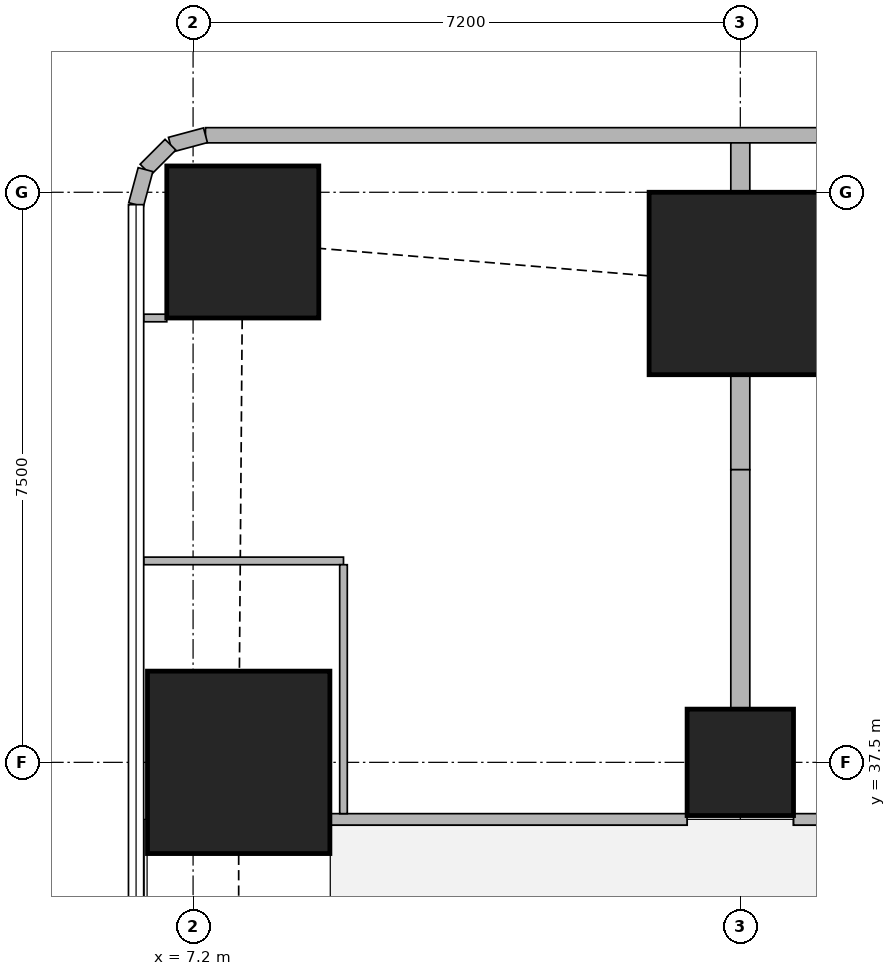
"""IFC4 building model, lengths in metres.
Left out: names, types, materials, properties, quantities, classifications, styles, units other than length and angle.
Written with IfcOpenShell. Run it as: python <this file> out.ifc"""

import sys

from ifc_helpers import new_model, si_unit, direction, frame, frame_2d, origin, origin_2d, place, context, subcontext, project, spatial, rectangle, extrude, element, fill, save


model = new_model("IFC4")
c1 = context("Model", 3, precision=1e-05, world=origin(), true_north=direction((0.0, 1.0)))
c2 = subcontext(c1, "Body", "Model", "MODEL_VIEW")
j1 = project(units=[si_unit("LENGTHUNIT", "METRE"), si_unit("PLANEANGLEUNIT", "RADIAN")], contexts=[c1])
p1 = place(None, origin())
s1 = spatial("IfcSite", under=j1, at=p1, CompositionType="ELEMENT")
p2 = place(p1, origin())
s2 = spatial("IfcBuilding", under=s1, at=p2, CompositionType="ELEMENT")
p3 = place(p2, frame((0.0, 0.0, 216.2)))
s3 = spatial("IfcBuildingStorey", under=s2, at=p3, CompositionType="ELEMENT", Elevation=216.2)
p4 = place(p3, frame((7.8, 37.5, 0.0), z_axis=(0.0, 0.0, 1.0), x_axis=(1.0, 0.0, 0.0)))
e1 = element("IfcColumn", 1, at=p4, inside=s3, PredefinedType="COLUMN", context=c2, shape_type="SweptSolid", body=[
    extrude(rectangle(XDim=2.4, YDim=2.4, at=origin_2d()), origin(), (0.0, 0.0, 1.0), 3.75),
])
p5 = place(p3, frame((14.4, 37.5, 0.0), z_axis=(0.0, 0.0, 1.0), x_axis=(1.0, 0.0, 0.0)))
e2 = element("IfcColumn", 2, at=p5, inside=s3, PredefinedType="COLUMN", context=c2, shape_type="SweptSolid", body=[
    extrude(rectangle(XDim=1.4, YDim=1.4, at=origin_2d()), origin(), (0.0, 0.0, 1.0), 3.75),
])
p6 = place(p3, frame((7.854, 44.346, 0.0), z_axis=(0.0, 0.0, 1.0), x_axis=(1.0, 0.0, 0.0)))
e3 = element("IfcColumn", 3, at=p6, inside=s3, PredefinedType="COLUMN", context=c2, shape_type="SweptSolid", body=[
    extrude(rectangle(XDim=2.0, YDim=2.0, at=origin_2d()), origin(), (0.0, 0.0, 1.0), 3.75),
])
p7 = place(p3, frame((14.4, 43.8, 0.0), z_axis=(0.0, 0.0, 1.0), x_axis=(1.0, 0.0, 0.0)))
e4 = element("IfcColumn", 4, at=p7, inside=s3, PredefinedType="COLUMN", context=c2, shape_type="SweptSolid", body=[
    extrude(rectangle(XDim=2.4, YDim=2.4, at=origin_2d()), origin(), (0.0, 0.0, 1.0), 3.75),
])
p8 = place(p3, frame((40.106, 45.75, 0.0), z_axis=(0.0, 0.0, 1.0), x_axis=(-1.0, 0.0, 0.0)))
e5 = element("IfcWall", 5, at=p8, inside=s3, PredefinedType="SOLIDWALL", context=c2, shape_type="SweptSolid", body=[
    extrude(rectangle(XDim=32.743, YDim=0.2, at=frame_2d((16.372, 0.0))), origin(), (0.0, 0.0, 1.0), 3.5),
])
p9 = place(p8, frame((8.606, 0.0, 0.9)))
e6 = element("IfcOpeningElement", 6, at=p9, cuts=e5, PredefinedType="OPENING", context=c2, shape_type="SweptSolid", body=[
    extrude(rectangle(XDim=1.8, YDim=1.5, at=frame_2d((0.9, 0.75))), frame((0.0, 0.11, 0.0), z_axis=(0.0, -1.0, 0.0), x_axis=(1.0, 0.0, 0.0)), (0.0, 0.0, 1.0), 0.22),
])
p10 = place(p8, frame((12.206, 0.0, 0.9)))
e7 = element("IfcOpeningElement", 7, at=p10, cuts=e5, PredefinedType="OPENING", context=c2, shape_type="SweptSolid", body=[
    extrude(rectangle(XDim=1.8, YDim=1.5, at=frame_2d((0.9, 0.75))), frame((0.0, 0.11, 0.0), z_axis=(0.0, -1.0, 0.0), x_axis=(1.0, 0.0, 0.0)), (0.0, 0.0, 1.0), 0.22),
])
p11 = place(p8, frame((15.806, 0.0, 0.9)))
e8 = element("IfcOpeningElement", 8, at=p11, cuts=e5, PredefinedType="OPENING", context=c2, shape_type="SweptSolid", body=[
    extrude(rectangle(XDim=1.8, YDim=1.5, at=frame_2d((0.9, 0.75))), frame((0.0, 0.11, 0.0), z_axis=(0.0, -1.0, 0.0), x_axis=(1.0, 0.0, 0.0)), (0.0, 0.0, 1.0), 0.22),
])
p12 = place(p8, frame((19.406, 0.0, 0.9)))
e9 = element("IfcOpeningElement", 9, at=p12, cuts=e5, PredefinedType="OPENING", context=c2, shape_type="SweptSolid", body=[
    extrude(rectangle(XDim=1.8, YDim=1.5, at=frame_2d((0.9, 0.75))), frame((0.0, 0.11, 0.0), z_axis=(0.0, -1.0, 0.0), x_axis=(1.0, 0.0, 0.0)), (0.0, 0.0, 1.0), 0.22),
])
p13 = place(p8, frame((23.006, 0.0, 0.9)))
e10 = element("IfcOpeningElement", 10, at=p13, cuts=e5, PredefinedType="OPENING", context=c2, shape_type="SweptSolid", body=[
    extrude(rectangle(XDim=1.8, YDim=1.5, at=frame_2d((0.9, 0.75))), frame((0.0, 0.11, 0.0), z_axis=(0.0, -1.0, 0.0), x_axis=(1.0, 0.0, 0.0)), (0.0, 0.0, 1.0), 0.22),
])
p14 = place(p8, frame((28.025, 0.0, 0.9)))
e11 = element("IfcOpeningElement", 11, at=p14, cuts=e5, PredefinedType="OPENING", context=c2, shape_type="SweptSolid", body=[
    extrude(rectangle(XDim=2.4, YDim=1.5, at=frame_2d((1.2, 0.75))), frame((0.0, 0.11, 0.0), z_axis=(0.0, -1.0, 0.0), x_axis=(1.0, 0.0, 0.0)), (0.0, 0.0, 1.0), 0.22),
])
p15 = place(p3, frame((7.363, 45.75, 0.0), z_axis=(0.0, 0.0, 1.0), x_axis=(-0.965655254015, -0.259826731483, 0.0)))
e12 = element("IfcWall", 12, at=p15, inside=s3, PredefinedType="SOLIDWALL", context=c2, shape_type="SweptSolid", body=[
    extrude(rectangle(XDim=0.477, YDim=0.2, at=frame_2d((0.239, 0.0))), origin(), (0.0, 0.0, 1.0), 3.5),
])
p16 = place(p3, frame((6.902, 45.626, 0.0), z_axis=(0.0, 0.0, 1.0), x_axis=(-0.707369890659, -0.706843573776, 0.0)))
e13 = element("IfcWall", 13, at=p16, inside=s3, PredefinedType="SOLIDWALL", context=c2, shape_type="SweptSolid", body=[
    extrude(rectangle(XDim=0.464, YDim=0.2, at=frame_2d((0.232, 0.0))), origin(), (0.0, 0.0, 1.0), 3.5),
])
p17 = place(p3, frame((6.574, 45.298, 0.0), z_axis=(0.0, 0.0, 1.0), x_axis=(-0.259698463175, -0.965689757751, 0.0)))
e14 = element("IfcWall", 14, at=p17, inside=s3, PredefinedType="SOLIDWALL", context=c2, shape_type="SweptSolid", body=[
    extrude(rectangle(XDim=0.478, YDim=0.2, at=frame_2d((0.239, 0.0))), origin(), (0.0, 0.0, 1.0), 3.5),
])
p18 = place(p3, frame((9.001, 36.75, 0.0), z_axis=(0.0, 0.0, 1.0), x_axis=(1.0, 0.0, 0.0)))
e15 = element("IfcWall", 15, at=p18, inside=s3, PredefinedType="SOLIDWALL", context=c2, shape_type="SweptSolid", body=[
    extrude(rectangle(XDim=4.698, YDim=0.15, at=frame_2d((2.349, 0.0))), origin(), (0.0, 0.0, 1.0), 3.5),
])
p19 = place(p18, frame((0.353, 0.0, 0.0)))
e16 = element("IfcOpeningElement", 16, at=p19, cuts=e15, PredefinedType="OPENING", context=c2, shape_type="SweptSolid", body=[
    extrude(rectangle(XDim=1.0, YDim=2.1, at=frame_2d((0.5, 1.05))), frame((0.0, 0.085, 0.0), z_axis=(0.0, -1.0, 0.0), x_axis=(1.0, 0.0, 0.0)), (0.0, 0.0, 1.0), 0.17),
])
p20 = place(p3, frame((15.101, 36.75, 0.0), z_axis=(0.0, 0.0, 1.0), x_axis=(1.0, 0.0, 0.0)))
e17 = element("IfcWall", 17, at=p20, inside=s3, PredefinedType="SOLIDWALL", context=c2, shape_type="SweptSolid", body=[
    extrude(rectangle(XDim=5.798, YDim=0.15, at=frame_2d((2.899, 0.0))), origin(), (0.0, 0.0, 1.0), 3.5),
])
p21 = place(p20, frame((0.799, 0.0, 0.0)))
e18 = element("IfcOpeningElement", 18, at=p21, cuts=e17, PredefinedType="OPENING", context=c2, shape_type="SweptSolid", body=[
    extrude(rectangle(XDim=1.0, YDim=2.1, at=frame_2d((0.5, 1.05))), frame((0.0, 0.085, 0.0), z_axis=(0.0, -1.0, 0.0), x_axis=(1.0, 0.0, 0.0)), (0.0, 0.0, 1.0), 0.17),
])
p22 = place(p3, frame((6.854, 43.346, 0.0), z_axis=(0.0, 0.0, 1.0), x_axis=(-1.0, 0.0, 0.0)))
e19 = element("IfcWall", 19, at=p22, inside=s3, PredefinedType="PARTITIONING", context=c2, shape_type="SweptSolid", body=[
    extrude(rectangle(XDim=0.304, YDim=0.1, at=frame_2d((0.152, 0.0))), origin(), (0.0, 0.0, 1.0), 2.05),
])
p23 = place(p3, frame((6.55, 40.15, 0.0), z_axis=(0.0, 0.0, 1.0), x_axis=(1.0, 0.0, 0.0)))
e20 = element("IfcWall", 20, at=p23, inside=s3, PredefinedType="PARTITIONING", context=c2, shape_type="SweptSolid", body=[
    extrude(rectangle(XDim=2.629, YDim=0.1, at=frame_2d((1.314, 0.0))), origin(), (0.0, 0.0, 1.0), 2.05),
])
p24 = place(p3, frame((9.179, 36.825, 0.0), z_axis=(0.0, 0.0, 1.0), x_axis=(0.0, 1.0, 0.0)))
e21 = element("IfcWall", 21, at=p24, inside=s3, PredefinedType="PARTITIONING", context=c2, shape_type="SweptSolid", body=[
    extrude(rectangle(XDim=3.275, YDim=0.1, at=frame_2d((1.638, 0.0))), origin(), (0.0, 0.0, 1.0), 3.5),
])
p25 = place(p24, frame((2.225, 0.0, 0.0)))
e22 = element("IfcOpeningElement", 22, at=p25, cuts=e21, PredefinedType="OPENING", context=c2, shape_type="SweptSolid", body=[
    extrude(rectangle(XDim=0.9, YDim=2.1, at=frame_2d((0.45, 1.05))), frame((0.0, 0.06, 0.0), z_axis=(0.0, -1.0, 0.0), x_axis=(1.0, 0.0, 0.0)), (0.0, 0.0, 1.0), 0.12),
])
p26 = place(p3, frame((14.4, 41.35, 0.0), z_axis=(0.0, 0.0, 1.0), x_axis=(0.0, 1.0, 0.0)))
e23 = element("IfcWall", 23, at=p26, inside=s3, PredefinedType="SOLIDWALL", context=c2, shape_type="SweptSolid", body=[
    extrude(rectangle(XDim=1.249, YDim=0.25, at=frame_2d((0.625, 0.0))), origin(), (0.0, 0.0, 1.0), 2.05),
])
p27 = place(p3, frame((14.4, 45.001, 0.0), z_axis=(0.0, 0.0, 1.0), x_axis=(0.0, 1.0, 0.0)))
e24 = element("IfcWall", 24, at=p27, inside=s3, PredefinedType="SOLIDWALL", context=c2, shape_type="SweptSolid", body=[
    extrude(rectangle(XDim=0.649, YDim=0.25, at=frame_2d((0.324, 0.0))), origin(), (0.0, 0.0, 1.0), 2.05),
])
p28 = place(p3, frame((14.4, 38.201, 0.0), z_axis=(0.0, 0.0, 1.0), x_axis=(0.0, 1.0, 0.0)))
e25 = element("IfcWall", 25, at=p28, inside=s3, PredefinedType="SOLIDWALL", context=c2, shape_type="SweptSolid", body=[
    extrude(rectangle(XDim=3.149, YDim=0.25, at=frame_2d((1.575, 0.0))), origin(), (0.0, 0.0, 1.0), 3.5),
])
p29 = place(p13, origin())
e26 = element("IfcWindow", 26, at=p29, inside=s3, PartitioningType="SINGLE_PANEL", PredefinedType="WINDOW", context=c2, shape_type="SweptSolid", body=[
    extrude(rectangle(XDim=1.8, YDim=1.5, at=frame_2d((0.9, 0.75))), frame((0.0, 0.03, 0.0), z_axis=(0.0, -1.0, 0.0), x_axis=(1.0, 0.0, 0.0)), (0.0, 0.0, 1.0), 0.06),
])
fill(e10, e26)
p30 = place(p14, origin())
e27 = element("IfcWindow", 27, at=p30, inside=s3, PartitioningType="SINGLE_PANEL", PredefinedType="WINDOW", context=c2, shape_type="SweptSolid", body=[
    extrude(rectangle(XDim=2.4, YDim=1.5, at=frame_2d((1.2, 0.75))), frame((0.0, 0.03, 0.0), z_axis=(0.0, -1.0, 0.0), x_axis=(1.0, 0.0, 0.0)), (0.0, 0.0, 1.0), 0.06),
])
fill(e11, e27)
p31 = place(p25, origin())
e28 = element("IfcDoor", 28, at=p31, inside=s3, OperationType="SINGLE_SWING_RIGHT", PredefinedType="DOOR", context=c2, shape_type="SweptSolid", body=[
    extrude(rectangle(XDim=0.9, YDim=2.1, at=frame_2d((0.45, 1.05))), frame((0.0, 0.025, 0.0), z_axis=(0.0, -1.0, 0.0), x_axis=(1.0, 0.0, 0.0)), (0.0, 0.0, 1.0), 0.05),
])
fill(e22, e28)
p32 = place(p19, origin())
e29 = element("IfcDoor", 29, at=p32, inside=s3, OperationType="SINGLE_SWING_LEFT", PredefinedType="DOOR", context=c2, shape_type="SweptSolid", body=[
    extrude(rectangle(XDim=1.0, YDim=2.1, at=frame_2d((0.5, 1.05))), frame((0.0, 0.025, 0.0), z_axis=(0.0, -1.0, 0.0), x_axis=(1.0, 0.0, 0.0)), (0.0, 0.0, 1.0), 0.05),
])
fill(e16, e29)
save(model, sys.argv[1])
